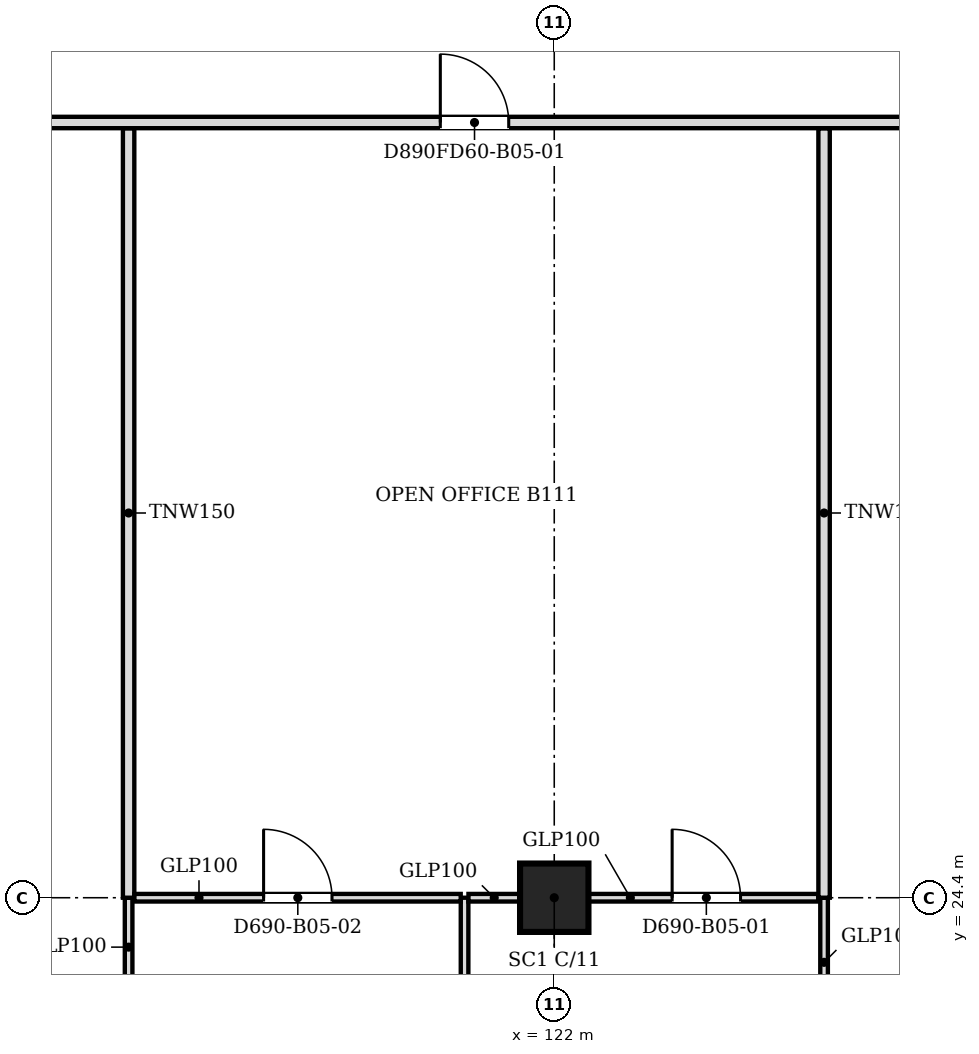
"""IFC4 building model, lengths in metres.
Left out: names, types, materials, properties, quantities, classifications, styles, units other than length and angle.
Written with IfcOpenShell. Run it as: python <this file> out.ifc"""

import sys

from ifc_helpers import new_model, si_unit, direction, frame, frame_2d, origin, origin_2d, place, context, subcontext, project, spatial, rectangle, extrude, source, transform, mapped, element, fill, save


model = new_model("IFC4")
c1 = context("Model", 3, precision=1e-05, world=origin(), true_north=direction((0.0, 1.0)))
c2 = subcontext(c1, "Body", "Model", "MODEL_VIEW")
j1 = project(units=[si_unit("LENGTHUNIT", "METRE"), si_unit("PLANEANGLEUNIT", "RADIAN")], contexts=[c1])
p1 = place(None, origin())
s1 = spatial("IfcSite", under=j1, at=p1, CompositionType="ELEMENT")
p2 = place(p1, origin())
s2 = spatial("IfcBuilding", under=s1, at=p2, CompositionType="ELEMENT")
p3 = place(p2, frame((0.0, 0.0, 52.4)))
s3 = spatial("IfcBuildingStorey", under=s2, at=p3, CompositionType="ELEMENT", Elevation=52.4)
p4 = place(p3, frame((122.0, 24.4, 0.0), z_axis=(0.0, 0.0, 1.0), x_axis=(1.0, 0.0, 0.0)))
e1 = element("IfcColumn", 1, at=p4, inside=s3, PredefinedType="COLUMN", context=c2, shape_type="SweptSolid", body=[
    extrude(rectangle(XDim=0.9, YDim=0.9, at=origin_2d()), origin(), (0.0, 0.0, 1.0), 3.6),
])
p5 = place(p3, frame((120.82, 18.8, 0.0), z_axis=(0.0, 0.0, 1.0), x_axis=(0.0, 1.0, 0.0)))
e2 = element("IfcWall", 2, at=p5, inside=s3, PredefinedType="PARTITIONING", context=c2, shape_type="SweptSolid", body=[
    extrude(rectangle(XDim=5.6, YDim=0.1, at=frame_2d((2.8, 0.0))), origin(), (0.0, 0.0, 1.0), 3.067),
])
p6 = place(p3, frame((125.55, 22.701, 0.0), z_axis=(0.0, 0.0, 1.0), x_axis=(0.0, 1.0, 0.0)))
e3 = element("IfcWall", 3, at=p6, inside=s3, PredefinedType="PARTITIONING", context=c2, shape_type="SweptSolid", body=[
    extrude(rectangle(XDim=1.698, YDim=0.1, at=frame_2d((0.849, 0.0))), origin(), (0.0, 0.0, 1.0), 3.067),
])
p7 = place(p3, frame((116.4, 23.101, 0.0), z_axis=(0.0, 0.0, 1.0), x_axis=(0.0, 1.0, 0.0)))
e4 = element("IfcWall", 4, at=p7, inside=s3, PredefinedType="PARTITIONING", context=c2, shape_type="SweptSolid", body=[
    extrude(rectangle(XDim=1.298, YDim=0.1, at=frame_2d((0.649, 0.0))), origin(), (0.0, 0.0, 1.0), 3.067),
])
p8 = place(p3, frame((116.4, 24.4, 0.0), z_axis=(0.0, 0.0, 1.0), x_axis=(0.0, 1.0, 0.0)))
e5 = element("IfcWall", 5, at=p8, inside=s3, PredefinedType="PARTITIONING", context=c2, shape_type="SweptSolid", body=[
    extrude(rectangle(XDim=10.124, YDim=0.15, at=frame_2d((5.062, 0.0))), origin(), (0.0, 0.0, 1.0), 3.067),
])
p9 = place(p3, frame((120.769, 24.4, 0.0), z_axis=(0.0, 0.0, 1.0), x_axis=(-1.0, 0.0, 0.0)))
e6 = element("IfcWall", 6, at=p9, inside=s3, PredefinedType="PARTITIONING", context=c2, shape_type="SweptSolid", body=[
    extrude(rectangle(XDim=4.293, YDim=0.1, at=frame_2d((2.146, 0.0))), origin(), (0.0, 0.0, 1.0), 3.067),
])
m1 = source(origin(), c2, "Body", "SweptSolid", [
    extrude(rectangle(XDim=0.9, YDim=2.1, at=frame_2d((0.45, 1.05))), frame((0.0, 0.06, 0.0), z_axis=(0.0, -1.0, 0.0), x_axis=(1.0, 0.0, 0.0)), (0.0, 0.0, 1.0), 0.12),
])
p10 = place(p9, frame((1.693, 0.0, 0.0)))
e7 = element("IfcOpeningElement", 7, at=p10, cuts=e6, PredefinedType="OPENING", context=c2, shape_type="MappedRepresentation", body=[
    mapped(m1, transform((0.0, 0.0, 0.0), scale=1.0)),
])
p11 = place(p3, frame((120.871, 24.4, 0.0), z_axis=(0.0, 0.0, 1.0), x_axis=(1.0, 0.0, 0.0)))
e8 = element("IfcWall", 8, at=p11, inside=s3, PredefinedType="PARTITIONING", context=c2, shape_type="SweptSolid", body=[
    extrude(rectangle(XDim=0.678, YDim=0.1, at=frame_2d((0.339, 0.0))), origin(), (0.0, 0.0, 1.0), 3.067),
])
p12 = place(p3, frame((125.474, 24.4, 0.0), z_axis=(0.0, 0.0, 1.0), x_axis=(-1.0, 0.0, 0.0)))
e9 = element("IfcWall", 9, at=p12, inside=s3, PredefinedType="PARTITIONING", context=c2, shape_type="SweptSolid", body=[
    extrude(rectangle(XDim=3.023, YDim=0.1, at=frame_2d((1.512, 0.0))), origin(), (0.0, 0.0, 1.0), 3.067),
])
p13 = place(p12, frame((1.023, 0.0, 0.0)))
e10 = element("IfcOpeningElement", 10, at=p13, cuts=e9, PredefinedType="OPENING", context=c2, shape_type="MappedRepresentation", body=[
    mapped(m1, transform((0.0, 0.0, 0.0), scale=1.0)),
])
p14 = place(p3, frame((125.55, 24.4, 0.0), z_axis=(0.0, 0.0, 1.0), x_axis=(0.0, 1.0, 0.0)))
e11 = element("IfcWall", 11, at=p14, inside=s3, PredefinedType="PARTITIONING", context=c2, shape_type="SweptSolid", body=[
    extrude(rectangle(XDim=10.124, YDim=0.15, at=frame_2d((5.062, 0.0))), origin(), (0.0, 0.0, 1.0), 3.067),
])
p15 = place(p3, frame((133.7, 34.6, 0.0), z_axis=(0.0, 0.0, 1.0), x_axis=(-1.0, 0.0, 0.0)))
e12 = element("IfcWall", 12, at=p15, inside=s3, PredefinedType="PARTITIONING", context=c2, shape_type="SweptSolid", body=[
    extrude(rectangle(XDim=47.8, YDim=0.15, at=frame_2d((23.9, 0.0))), origin(), (0.0, 0.0, 1.0), 3.067),
])
m2 = source(origin(), c2, "Body", "SweptSolid", [
    extrude(rectangle(XDim=1.0, YDim=2.1, at=frame_2d((0.5, 1.05))), frame((0.0, 0.085, 0.0), z_axis=(0.0, -1.0, 0.0), x_axis=(1.0, 0.0, 0.0)), (0.0, 0.0, 1.0), 0.17),
])
p16 = place(p15, frame((3.549, 0.0, 0.0)))
e13 = element("IfcOpeningElement", 13, at=p16, cuts=e12, PredefinedType="OPENING", context=c2, shape_type="MappedRepresentation", body=[
    mapped(m2, transform((0.0, 0.0, 0.0), scale=1.0)),
])
p17 = place(p15, frame((42.7, 0.0, 0.0)))
e14 = element("IfcOpeningElement", 14, at=p17, cuts=e12, PredefinedType="OPENING", context=c2, shape_type="MappedRepresentation", body=[
    mapped(m2, transform((0.0, 0.0, 0.0), scale=1.0)),
])
m3 = source(origin(), c2, "Body", "SweptSolid", [
    extrude(rectangle(XDim=0.9, YDim=2.1, at=frame_2d((0.45, 1.05))), frame((0.0, 0.085, 0.0), z_axis=(0.0, -1.0, 0.0), x_axis=(1.0, 0.0, 0.0)), (0.0, 0.0, 1.0), 0.17),
])
p18 = place(p15, frame((12.299, 0.0, 0.0)))
e15 = element("IfcOpeningElement", 15, at=p18, cuts=e12, PredefinedType="OPENING", context=c2, shape_type="MappedRepresentation", body=[
    mapped(m3, transform((0.0, 0.0, 0.0), scale=1.0)),
])
p19 = place(p15, frame((21.349, 0.0, 0.0)))
e16 = element("IfcOpeningElement", 16, at=p19, cuts=e12, PredefinedType="OPENING", context=c2, shape_type="MappedRepresentation", body=[
    mapped(m2, transform((0.0, 0.0, 0.0), scale=1.0)),
])
p20 = place(p15, frame((32.05, 0.0, 0.0)))
e17 = element("IfcOpeningElement", 17, at=p20, cuts=e12, PredefinedType="OPENING", context=c2, shape_type="MappedRepresentation", body=[
    mapped(m2, transform((0.0, 0.0, 0.0), scale=1.0)),
])
m4 = source(origin(), c2, "Body", "SweptSolid", [
    extrude(rectangle(XDim=0.9, YDim=2.1, at=frame_2d((0.45, 1.05))), frame((0.0, 0.025, 0.0), z_axis=(0.0, -1.0, 0.0), x_axis=(1.0, 0.0, 0.0)), (0.0, 0.0, 1.0), 0.05),
])
p21 = place(p13, origin())
e18 = element("IfcDoor", 18, at=p21, inside=s3, OperationType="SINGLE_SWING_RIGHT", PredefinedType="DOOR", context=c2, shape_type="MappedRepresentation", body=[
    mapped(m4, transform((0.0, 0.0, 0.0), scale=1.0)),
])
fill(e10, e18)
p22 = place(p10, origin())
e19 = element("IfcDoor", 19, at=p22, inside=s3, OperationType="SINGLE_SWING_RIGHT", PredefinedType="DOOR", context=c2, shape_type="MappedRepresentation", body=[
    mapped(m4, transform((0.0, 0.0, 0.0), scale=1.0)),
])
fill(e7, e19)
p23 = place(p18, origin())
e20 = element("IfcDoor", 20, at=p23, inside=s3, OperationType="SINGLE_SWING_RIGHT", PredefinedType="DOOR", context=c2, shape_type="MappedRepresentation", body=[
    mapped(m4, transform((0.0, 0.0, 0.0), scale=1.0)),
])
fill(e15, e20)
save(model, sys.argv[1])
